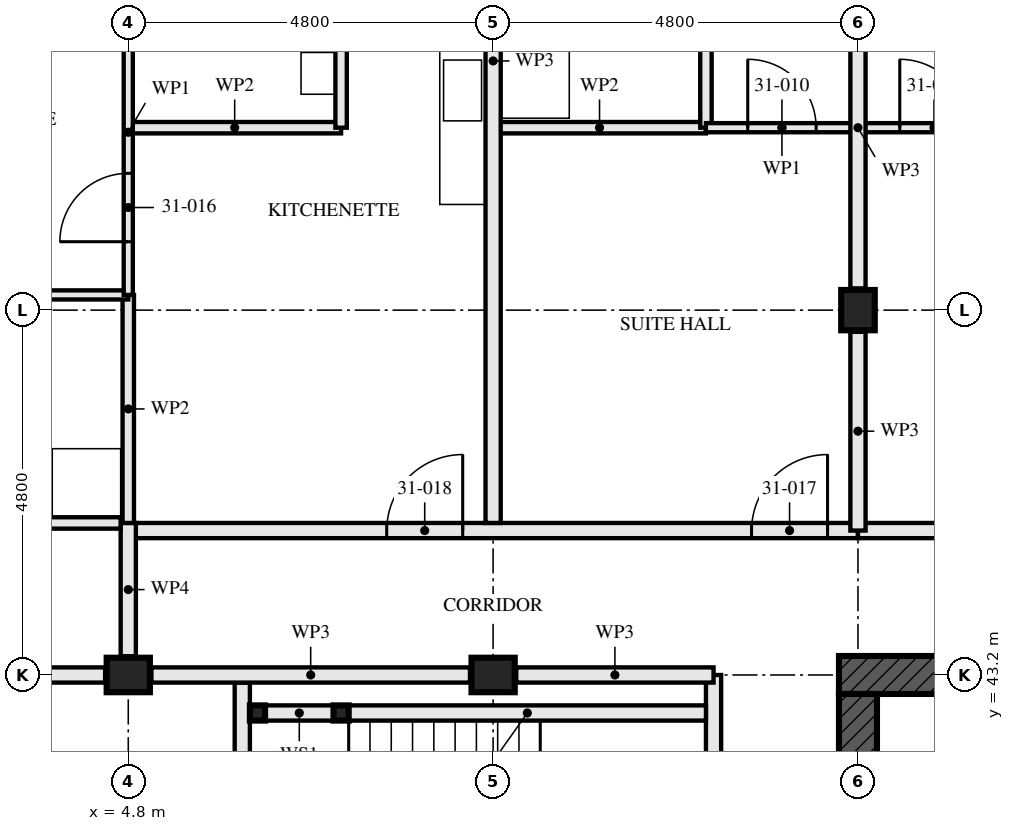
"""IFC4 building model, lengths in metres.
Left out: names, types, materials, properties, quantities, classifications, styles, units other than length and angle.
Written with IfcOpenShell. Run it as: python <this file> out.ifc"""

import sys

from ifc_helpers import new_model, si_unit, direction, frame, frame_2d, origin, origin_2d, place, context, subcontext, project, spatial, rectangle, hollow_rectangle, i_section, extrude, element, fill, save


model = new_model("IFC4")
c1 = context("Model", 3, precision=1e-05, world=origin(), true_north=direction((0.0, 1.0)))
c2 = subcontext(c1, "Body", "Model", "MODEL_VIEW")
j1 = project(units=[si_unit("LENGTHUNIT", "METRE"), si_unit("PLANEANGLEUNIT", "RADIAN")], contexts=[c1])
p1 = place(None, origin())
s1 = spatial("IfcSite", under=j1, at=p1, CompositionType="ELEMENT")
p2 = place(p1, origin())
s2 = spatial("IfcBuilding", under=s1, at=p2, CompositionType="ELEMENT")
p3 = place(p2, frame((0.0, 0.0, 115.5)))
s3 = spatial("IfcBuildingStorey", under=s2, at=p3, CompositionType="ELEMENT", Elevation=115.5)
for number, where, z_axis, x_axis in (
    (1, (4.8, 43.2, 0.0), (0.0, 0.0, 1.0), (0.0, 1.0, 0.0)),
    (2, (9.6, 43.2, 0.0), (0.0, 0.0, 1.0), (0.0, 1.0, 0.0)),
):
    element("IfcColumn", number, at=place(p3, frame(where, z_axis=z_axis, x_axis=x_axis)), inside=s3, PredefinedType="COLUMN", context=c2, shape_type="SweptSolid", body=[
        extrude(i_section(OverallWidth=0.454, OverallDepth=0.569, WebThickness=0.078, FlangeThickness=0.125, FilletRadius=0.015, at=origin_2d()), origin(), (0.0, 0.0, 1.0), 3.5),
    ])
p4 = place(p3, frame((14.4, 48.0, 0.0), z_axis=(0.0, 0.0, 1.0), x_axis=(1.0, 0.0, 0.0)))
e3 = element("IfcColumn", 3, at=p4, inside=s3, PredefinedType="COLUMN", context=c2, shape_type="SweptSolid", body=[
    extrude(i_section(OverallWidth=0.442, OverallDepth=0.531, WebThickness=0.066, FlangeThickness=0.106, FilletRadius=0.015, at=origin_2d()), origin(), (0.0, 0.0, 1.0), 3.5),
])
p5 = place(p3, frame((29.05, 43.2, -0.17), z_axis=(0.0, 0.0, 1.0), x_axis=(-1.0, 0.0, 0.0)))
e4 = element("IfcWall", 4, at=p5, inside=s3, PredefinedType="SHEAR", context=c2, shape_type="SweptSolid", body=[
    extrude(rectangle(XDim=14.9, YDim=0.5, at=frame_2d((7.45, 0.0))), origin(), (0.0, 0.0, 1.0), 3.5),
])
p6 = place(p5, frame((6.85, 0.0, 0.17)))
e5 = element("IfcOpeningElement", 5, at=p6, cuts=e4, PredefinedType="OPENING", context=c2, shape_type="SweptSolid", body=[
    extrude(rectangle(XDim=1.2, YDim=2.1, at=frame_2d((0.6, 1.05))), frame((0.0, 0.26, 0.0), z_axis=(0.0, -1.0, 0.0), x_axis=(1.0, 0.0, 0.0)), (0.0, 0.0, 1.0), 0.521),
])
p7 = place(p3, frame((14.4, 42.95, -0.17), z_axis=(0.0, 0.0, 1.0), x_axis=(0.0, -1.0, 0.0)))
e6 = element("IfcWall", 6, at=p7, inside=s3, PredefinedType="SHEAR", context=c2, shape_type="SweptSolid", body=[
    extrude(rectangle(XDim=13.9, YDim=0.5, at=frame_2d((6.95, 0.0))), origin(), (0.0, 0.0, 1.0), 3.5),
])
p8 = place(p7, frame((6.35, 0.0, 0.17)))
e7 = element("IfcOpeningElement", 7, at=p8, cuts=e6, PredefinedType="OPENING", context=c2, shape_type="SweptSolid", body=[
    extrude(rectangle(XDim=1.2, YDim=2.1, at=frame_2d((0.6, 1.05))), frame((0.0, 0.26, 0.0), z_axis=(0.0, -1.0, 0.0), x_axis=(1.0, 0.0, 0.0)), (0.0, 0.0, 1.0), 0.521),
])
for number, where, z_axis, x_axis in (
    (8, (6.5, 42.7, 0.0), (0.0, 0.0, 1.0), (1.0, 0.0, 0.0)),
    (9, (7.6, 42.7, 0.0), (0.0, 0.0, 1.0), (1.0, 0.0, 0.0)),
):
    element("IfcColumn", number, at=place(p3, frame(where, z_axis=z_axis, x_axis=x_axis)), inside=s3, PredefinedType="COLUMN", context=c2, shape_type="SweptSolid", body=[
        extrude(hollow_rectangle(XDim=0.2, YDim=0.2, WallThickness=0.008, at=origin_2d()), origin(), (0.0, 0.0, 1.0), 3.33),
    ])
p9 = place(p3, frame((6.6, 42.7, 0.0), z_axis=(0.0, 0.0, 1.0), x_axis=(1.0, 0.0, 0.0)))
e10 = element("IfcWall", 10, at=p9, inside=s3, PredefinedType="SOLIDWALL", context=c2, shape_type="SweptSolid", body=[
    extrude(rectangle(XDim=0.9, YDim=0.2, at=frame_2d((0.45, 0.0))), origin(), (0.0, 0.0, 1.0), 2.99),
])
p10 = place(p3, frame((7.7, 42.7, 0.0), z_axis=(0.0, 0.0, 1.0), x_axis=(1.0, 0.0, 0.0)))
e11 = element("IfcWall", 11, at=p10, inside=s3, PredefinedType="SOLIDWALL", context=c2, shape_type="SweptSolid", body=[
    extrude(rectangle(XDim=4.7, YDim=0.2, at=frame_2d((2.35, 0.0))), origin(), (0.0, 0.0, 1.0), 2.99),
])
p11 = place(p3, frame((6.3, 43.1, 0.0), z_axis=(0.0, 0.0, 1.0), x_axis=(0.0, -1.0, 0.0)))
e12 = element("IfcWall", 12, at=p11, inside=s3, PredefinedType="SOLIDWALL", context=c2, shape_type="SweptSolid", body=[
    extrude(rectangle(XDim=3.3, YDim=0.2, at=frame_2d((1.65, 0.0))), origin(), (0.0, 0.0, 1.0), 3.33),
])
p12 = place(p3, frame((12.5, 43.2, 0.0), z_axis=(0.0, 0.0, 1.0), x_axis=(0.0, -1.0, 0.0)))
e13 = element("IfcWall", 13, at=p12, inside=s3, PredefinedType="PARTITIONING", context=c2, shape_type="SweptSolid", body=[
    extrude(rectangle(XDim=14.84, YDim=0.2, at=frame_2d((7.42, 0.0))), origin(), (0.0, 0.0, 1.0), 2.32),
])
p13 = place(p12, frame((1.4, 0.0, 0.0)))
e14 = element("IfcOpeningElement", 14, at=p13, cuts=e13, PredefinedType="OPENING", context=c2, shape_type="SweptSolid", body=[
    extrude(rectangle(XDim=1.0, YDim=2.1, at=frame_2d((0.5, 1.05))), frame((0.0, 0.111, 0.0), z_axis=(0.0, -1.0, 0.0), x_axis=(1.0, 0.0, 0.0)), (0.0, 0.0, 1.0), 0.221),
])
p14 = place(p12, frame((5.2, 0.0, 0.0)))
e15 = element("IfcOpeningElement", 15, at=p14, cuts=e13, PredefinedType="OPENING", context=c2, shape_type="SweptSolid", body=[
    extrude(rectangle(XDim=1.0, YDim=2.1, at=frame_2d((0.5, 1.05))), frame((0.0, 0.111, 0.0), z_axis=(0.0, -1.0, 0.0), x_axis=(1.0, 0.0, 0.0)), (0.0, 0.0, 1.0), 0.221),
])
p15 = place(p12, frame((13.0, 0.0, 0.0)))
e16 = element("IfcOpeningElement", 16, at=p15, cuts=e13, PredefinedType="OPENING", context=c2, shape_type="SweptSolid", body=[
    extrude(rectangle(XDim=1.0, YDim=2.1, at=frame_2d((0.5, 1.05))), frame((0.0, 0.111, 0.0), z_axis=(0.0, -1.0, 0.0), x_axis=(1.0, 0.0, 0.0)), (0.0, 0.0, 1.0), 0.221),
])
p16 = place(p3, frame((12.4, 53.4, 0.0), z_axis=(0.0, 0.0, 1.0), x_axis=(0.0, -1.0, 0.0)))
e17 = element("IfcWall", 17, at=p16, inside=s3, PredefinedType="PARTITIONING", context=c2, shape_type="SweptSolid", body=[
    extrude(rectangle(XDim=3.0, YDim=0.15, at=frame_2d((1.5, 0.0))), origin(), (0.0, 0.0, 1.0), 2.55),
])
p17 = place(p3, frame((12.4, 50.4, 0.0), z_axis=(0.0, 0.0, 1.0), x_axis=(-1.0, 0.0, 0.0)))
e18 = element("IfcWall", 18, at=p17, inside=s3, PredefinedType="PARTITIONING", context=c2, shape_type="SweptSolid", body=[
    extrude(rectangle(XDim=2.8, YDim=0.15, at=frame_2d((1.4, 0.0))), origin(), (0.0, 0.0, 1.0), 3.33),
])
p18 = place(p3, frame((14.4, 50.4, 0.0), z_axis=(0.0, 0.0, 1.0), x_axis=(-1.0, 0.0, 0.0)))
e19 = element("IfcWall", 19, at=p18, inside=s3, PredefinedType="PARTITIONING", context=c2, shape_type="SweptSolid", body=[
    extrude(rectangle(XDim=2.0, YDim=0.12, at=frame_2d((1.0, 0.0))), origin(), (0.0, 0.0, 1.0), 3.33),
])
p19 = place(p18, frame((0.55, 0.0, 0.0)))
e20 = element("IfcOpeningElement", 20, at=p19, cuts=e19, PredefinedType="OPENING", context=c2, shape_type="SweptSolid", body=[
    extrude(rectangle(XDim=0.9, YDim=2.1, at=frame_2d((0.45, 1.05))), frame((0.0, 0.071, 0.0), z_axis=(0.0, -1.0, 0.0), x_axis=(1.0, 0.0, 0.0)), (0.0, 0.0, 1.0), 0.141),
])
p20 = place(p3, frame((9.6, 57.356, 0.0), z_axis=(0.0, 0.0, 1.0), x_axis=(0.0, -1.0, 0.0)))
e21 = element("IfcWall", 21, at=p20, inside=s3, PredefinedType="PARTITIONING", context=c2, shape_type="SweptSolid", body=[
    extrude(rectangle(XDim=12.156, YDim=0.2, at=frame_2d((6.078, 0.0))), origin(), (0.0, 0.0, 1.0), 2.55),
])
p21 = place(p3, frame((7.6, 53.4, 0.0), z_axis=(0.0, 0.0, 1.0), x_axis=(0.0, -1.0, 0.0)))
e22 = element("IfcWall", 22, at=p21, inside=s3, PredefinedType="PARTITIONING", context=c2, shape_type="SweptSolid", body=[
    extrude(rectangle(XDim=3.0, YDim=0.15, at=frame_2d((1.5, 0.0))), origin(), (0.0, 0.0, 1.0), 2.55),
])
p22 = place(p3, frame((7.6, 50.4, 0.0), z_axis=(0.0, 0.0, 1.0), x_axis=(-1.0, 0.0, 0.0)))
e23 = element("IfcWall", 23, at=p22, inside=s3, PredefinedType="PARTITIONING", context=c2, shape_type="SweptSolid", body=[
    extrude(rectangle(XDim=2.8, YDim=0.15, at=frame_2d((1.4, 0.0))), origin(), (0.0, 0.0, 1.0), 3.33),
])
p23 = place(p3, frame((4.8, 48.2, 0.0), z_axis=(0.0, 0.0, 1.0), x_axis=(0.0, -1.0, 0.0)))
e24 = element("IfcWall", 24, at=p23, inside=s3, PredefinedType="PARTITIONING", context=c2, shape_type="SweptSolid", body=[
    extrude(rectangle(XDim=3.0, YDim=0.15, at=frame_2d((1.5, 0.0))), origin(), (0.0, 0.0, 1.0), 2.55),
])
p24 = place(p3, frame((4.8, 48.2, 0.0), z_axis=(0.0, 0.0, 1.0), x_axis=(-1.0, 0.0, 0.0)))
e25 = element("IfcWall", 25, at=p24, inside=s3, PredefinedType="PARTITIONING", context=c2, shape_type="SweptSolid", body=[
    extrude(rectangle(XDim=4.556, YDim=0.12, at=frame_2d((2.278, 0.0))), origin(), (0.0, 0.0, 1.0), 3.33),
])
p25 = place(p24, frame((1.925, 0.0, 0.0)))
e26 = element("IfcOpeningElement", 26, at=p25, cuts=e25, PredefinedType="OPENING", context=c2, shape_type="SweptSolid", body=[
    extrude(rectangle(XDim=0.95, YDim=2.1, at=frame_2d((0.475, 1.05))), frame((0.0, 0.071, 0.0), z_axis=(0.0, -1.0, 0.0), x_axis=(1.0, 0.0, 0.0)), (0.0, 0.0, 1.0), 0.141),
])
p26 = place(p3, frame((4.8, 52.48, 0.0), z_axis=(0.0, 0.0, 1.0), x_axis=(0.0, -1.0, 0.0)))
e27 = element("IfcWall", 27, at=p26, inside=s3, PredefinedType="PARTITIONING", context=c2, shape_type="SweptSolid", body=[
    extrude(rectangle(XDim=4.28, YDim=0.12, at=frame_2d((2.14, 0.0))), origin(), (0.0, 0.0, 1.0), 3.33),
])
p27 = place(p26, frame((2.68, 0.0, 0.0)))
e28 = element("IfcOpeningElement", 28, at=p27, cuts=e27, PredefinedType="OPENING", context=c2, shape_type="SweptSolid", body=[
    extrude(rectangle(XDim=0.9, YDim=2.1, at=frame_2d((0.45, 1.05))), frame((0.0, 0.071, 0.0), z_axis=(0.0, -1.0, 0.0), x_axis=(1.0, 0.0, 0.0)), (0.0, 0.0, 1.0), 0.141),
])
p28 = place(p3, frame((14.4, 45.1, 0.0), z_axis=(0.0, 0.0, 1.0), x_axis=(-1.0, 0.0, 0.0)))
e29 = element("IfcWall", 29, at=p28, inside=s3, PredefinedType="PARTITIONING", context=c2, shape_type="SweptSolid", body=[
    extrude(rectangle(XDim=9.6, YDim=0.2, at=frame_2d((4.8, 0.0))), origin(), (0.0, 0.0, 1.0), 3.33),
])
p29 = place(p28, frame((0.4, 0.0, 0.0)))
e30 = element("IfcOpeningElement", 30, at=p29, cuts=e29, PredefinedType="OPENING", context=c2, shape_type="SweptSolid", body=[
    extrude(rectangle(XDim=1.0, YDim=2.1, at=frame_2d((0.5, 1.05))), frame((0.0, 0.111, 0.0), z_axis=(0.0, -1.0, 0.0), x_axis=(1.0, 0.0, 0.0)), (0.0, 0.0, 1.0), 0.221),
])
p30 = place(p28, frame((5.2, 0.0, 0.0)))
e31 = element("IfcOpeningElement", 31, at=p30, cuts=e29, PredefinedType="OPENING", context=c2, shape_type="SweptSolid", body=[
    extrude(rectangle(XDim=1.0, YDim=2.1, at=frame_2d((0.5, 1.05))), frame((0.0, 0.111, 0.0), z_axis=(0.0, -1.0, 0.0), x_axis=(1.0, 0.0, 0.0)), (0.0, 0.0, 1.0), 0.221),
])
p31 = place(p3, frame((4.8, 45.2, 0.0), z_axis=(0.0, 0.0, 1.0), x_axis=(0.0, -1.0, 0.0)))
e32 = element("IfcWall", 32, at=p31, inside=s3, PredefinedType="PARTITIONING", context=c2, shape_type="SweptSolid", body=[
    extrude(rectangle(XDim=1.753, YDim=0.2, at=frame_2d((0.876, 0.0))), origin(), (0.0, 0.0, 1.0), 3.33),
])
p32 = place(p3, frame((16.4, 50.4, 0.0), z_axis=(0.0, 0.0, 1.0), x_axis=(-1.0, 0.0, 0.0)))
e33 = element("IfcWall", 33, at=p32, inside=s3, PredefinedType="PARTITIONING", context=c2, shape_type="SweptSolid", body=[
    extrude(rectangle(XDim=2.0, YDim=0.12, at=frame_2d((1.0, 0.0))), origin(), (0.0, 0.0, 1.0), 3.33),
])
p33 = place(p32, frame((0.55, 0.0, 0.0)))
e34 = element("IfcOpeningElement", 34, at=p33, cuts=e33, PredefinedType="OPENING", context=c2, shape_type="SweptSolid", body=[
    extrude(rectangle(XDim=0.9, YDim=2.1, at=frame_2d((0.45, 1.05))), frame((0.0, 0.071, 0.0), z_axis=(0.0, -1.0, 0.0), x_axis=(1.0, 0.0, 0.0)), (0.0, 0.0, 1.0), 0.141),
])
p34 = place(p3, frame((29.24, 45.1, 0.0), z_axis=(0.0, 0.0, 1.0), x_axis=(-1.0, 0.0, 0.0)))
e35 = element("IfcWall", 35, at=p34, inside=s3, PredefinedType="PARTITIONING", context=c2, shape_type="SweptSolid", body=[
    extrude(rectangle(XDim=14.84, YDim=0.2, at=frame_2d((7.42, 0.0))), origin(), (0.0, 0.0, 1.0), 2.32),
])
p35 = place(p34, frame((0.84, 0.0, 0.0)))
e36 = element("IfcOpeningElement", 36, at=p35, cuts=e35, PredefinedType="OPENING", context=c2, shape_type="SweptSolid", body=[
    extrude(rectangle(XDim=1.0, YDim=2.1, at=frame_2d((0.5, 1.05))), frame((0.0, 0.111, 0.0), z_axis=(0.0, -1.0, 0.0), x_axis=(1.0, 0.0, 0.0)), (0.0, 0.0, 1.0), 0.221),
])
p36 = place(p34, frame((5.64, 0.0, 0.0)))
e37 = element("IfcOpeningElement", 37, at=p36, cuts=e35, PredefinedType="OPENING", context=c2, shape_type="SweptSolid", body=[
    extrude(rectangle(XDim=1.0, YDim=2.1, at=frame_2d((0.5, 1.05))), frame((0.0, 0.111, 0.0), z_axis=(0.0, -1.0, 0.0), x_axis=(1.0, 0.0, 0.0)), (0.0, 0.0, 1.0), 0.221),
])
p37 = place(p34, frame((10.44, 0.0, 0.0)))
e38 = element("IfcOpeningElement", 38, at=p37, cuts=e35, PredefinedType="OPENING", context=c2, shape_type="SweptSolid", body=[
    extrude(rectangle(XDim=1.0, YDim=2.1, at=frame_2d((0.5, 1.05))), frame((0.0, 0.111, 0.0), z_axis=(0.0, -1.0, 0.0), x_axis=(1.0, 0.0, 0.0)), (0.0, 0.0, 1.0), 0.221),
])
p38 = place(p3, frame((12.5, 43.2, 0.0), z_axis=(0.0, 0.0, 1.0), x_axis=(-1.0, 0.0, 0.0)))
e39 = element("IfcWall", 39, at=p38, inside=s3, PredefinedType="PARTITIONING", context=c2, shape_type="SweptSolid", body=[
    extrude(rectangle(XDim=2.595, YDim=0.2, at=frame_2d((1.298, 0.0))), origin(), (0.0, 0.0, 1.0), 2.32),
])
p39 = place(p3, frame((9.295, 43.2, 0.0), z_axis=(0.0, 0.0, 1.0), x_axis=(-1.0, 0.0, 0.0)))
e40 = element("IfcWall", 40, at=p39, inside=s3, PredefinedType="PARTITIONING", context=c2, shape_type="SweptSolid", body=[
    extrude(rectangle(XDim=4.191, YDim=0.2, at=frame_2d((2.095, 0.0))), origin(), (0.0, 0.0, 1.0), 2.32),
])
p40 = place(p3, frame((4.496, 43.2, 0.0), z_axis=(0.0, 0.0, 1.0), x_axis=(-1.0, 0.0, 0.0)))
e41 = element("IfcWall", 41, at=p40, inside=s3, PredefinedType="PARTITIONING", context=c2, shape_type="SweptSolid", body=[
    extrude(rectangle(XDim=4.201, YDim=0.2, at=frame_2d((2.1, 0.0))), origin(), (0.0, 0.0, 1.0), 2.32),
])
p41 = place(p3, frame((14.4, 45.1, 0.0), z_axis=(0.0, 0.0, 1.0), x_axis=(0.0, 1.0, 0.0)))
e42 = element("IfcWall", 42, at=p41, inside=s3, PredefinedType="PARTITIONING", context=c2, shape_type="SweptSolid", body=[
    extrude(rectangle(XDim=2.615, YDim=0.2, at=frame_2d((1.307, 0.0))), origin(), (0.0, 0.0, 1.0), 2.32),
])
p42 = place(p3, frame((14.4, 48.285, 0.0), z_axis=(0.0, 0.0, 1.0), x_axis=(0.0, 1.0, 0.0)))
e43 = element("IfcWall", 43, at=p42, inside=s3, PredefinedType="PARTITIONING", context=c2, shape_type="SweptSolid", body=[
    extrude(rectangle(XDim=4.229, YDim=0.2, at=frame_2d((2.115, 0.0))), origin(), (0.0, 0.0, 1.0), 2.32),
])
p43 = place(p3, frame((4.7, 45.2, 0.0), z_axis=(0.0, 0.0, 1.0), x_axis=(-1.0, 0.0, 0.0)))
e44 = element("IfcWall", 44, at=p43, inside=s3, PredefinedType="PARTITIONING", context=c2, shape_type="SweptSolid", body=[
    extrude(rectangle(XDim=5.14, YDim=0.15, at=frame_2d((2.57, 0.0))), origin(), (0.0, 0.0, 1.0), 2.32),
])
p44 = place(p19, frame((0.9, 0.0, 0.0), z_axis=(0.0, 0.0, 1.0), x_axis=(-1.0, 0.0, 0.0)))
e45 = element("IfcDoor", 45, at=p44, inside=s3, OperationType="SINGLE_SWING_RIGHT", PredefinedType="DOOR", context=c2, shape_type="SweptSolid", body=[
    extrude(rectangle(XDim=0.9, YDim=2.1, at=frame_2d((0.45, 1.05))), frame((0.0, 0.022, 0.0), z_axis=(0.0, -1.0, 0.0), x_axis=(1.0, 0.0, 0.0)), (0.0, 0.0, 1.0), 0.044),
])
fill(e20, e45)
p45 = place(p27, frame((0.9, 0.0, 0.0), z_axis=(0.0, 0.0, 1.0), x_axis=(-1.0, 0.0, 0.0)))
e46 = element("IfcDoor", 46, at=p45, inside=s3, OperationType="SINGLE_SWING_RIGHT", PredefinedType="DOOR", context=c2, shape_type="SweptSolid", body=[
    extrude(rectangle(XDim=0.9, YDim=2.1, at=frame_2d((0.45, 1.05))), frame((0.0, 0.022, 0.0), z_axis=(0.0, -1.0, 0.0), x_axis=(1.0, 0.0, 0.0)), (0.0, 0.0, 1.0), 0.044),
])
fill(e28, e46)
p46 = place(p29, frame((1.0, 0.0, 0.0), z_axis=(0.0, 0.0, 1.0), x_axis=(-1.0, 0.0, 0.0)))
e47 = element("IfcDoor", 47, at=p46, inside=s3, OperationType="SINGLE_SWING_LEFT", PredefinedType="DOOR", context=c2, shape_type="SweptSolid", body=[
    extrude(rectangle(XDim=1.0, YDim=2.1, at=frame_2d((0.5, 1.05))), frame((0.0, 0.027, 0.0), z_axis=(0.0, -1.0, 0.0), x_axis=(1.0, 0.0, 0.0)), (0.0, 0.0, 1.0), 0.054),
])
fill(e30, e47)
p47 = place(p30, frame((1.0, 0.0, 0.0), z_axis=(0.0, 0.0, 1.0), x_axis=(-1.0, 0.0, 0.0)))
e48 = element("IfcDoor", 48, at=p47, inside=s3, OperationType="SINGLE_SWING_LEFT", PredefinedType="DOOR", context=c2, shape_type="SweptSolid", body=[
    extrude(rectangle(XDim=1.0, YDim=2.1, at=frame_2d((0.5, 1.05))), frame((0.0, 0.027, 0.0), z_axis=(0.0, -1.0, 0.0), x_axis=(1.0, 0.0, 0.0)), (0.0, 0.0, 1.0), 0.054),
])
fill(e31, e48)
p48 = place(p33, frame((0.9, 0.0, 0.0), z_axis=(0.0, 0.0, 1.0), x_axis=(-1.0, 0.0, 0.0)))
e49 = element("IfcDoor", 49, at=p48, inside=s3, OperationType="SINGLE_SWING_RIGHT", PredefinedType="DOOR", context=c2, shape_type="SweptSolid", body=[
    extrude(rectangle(XDim=0.9, YDim=2.1, at=frame_2d((0.45, 1.05))), frame((0.0, 0.022, 0.0), z_axis=(0.0, -1.0, 0.0), x_axis=(1.0, 0.0, 0.0)), (0.0, 0.0, 1.0), 0.044),
])
fill(e34, e49)
save(model, sys.argv[1])
